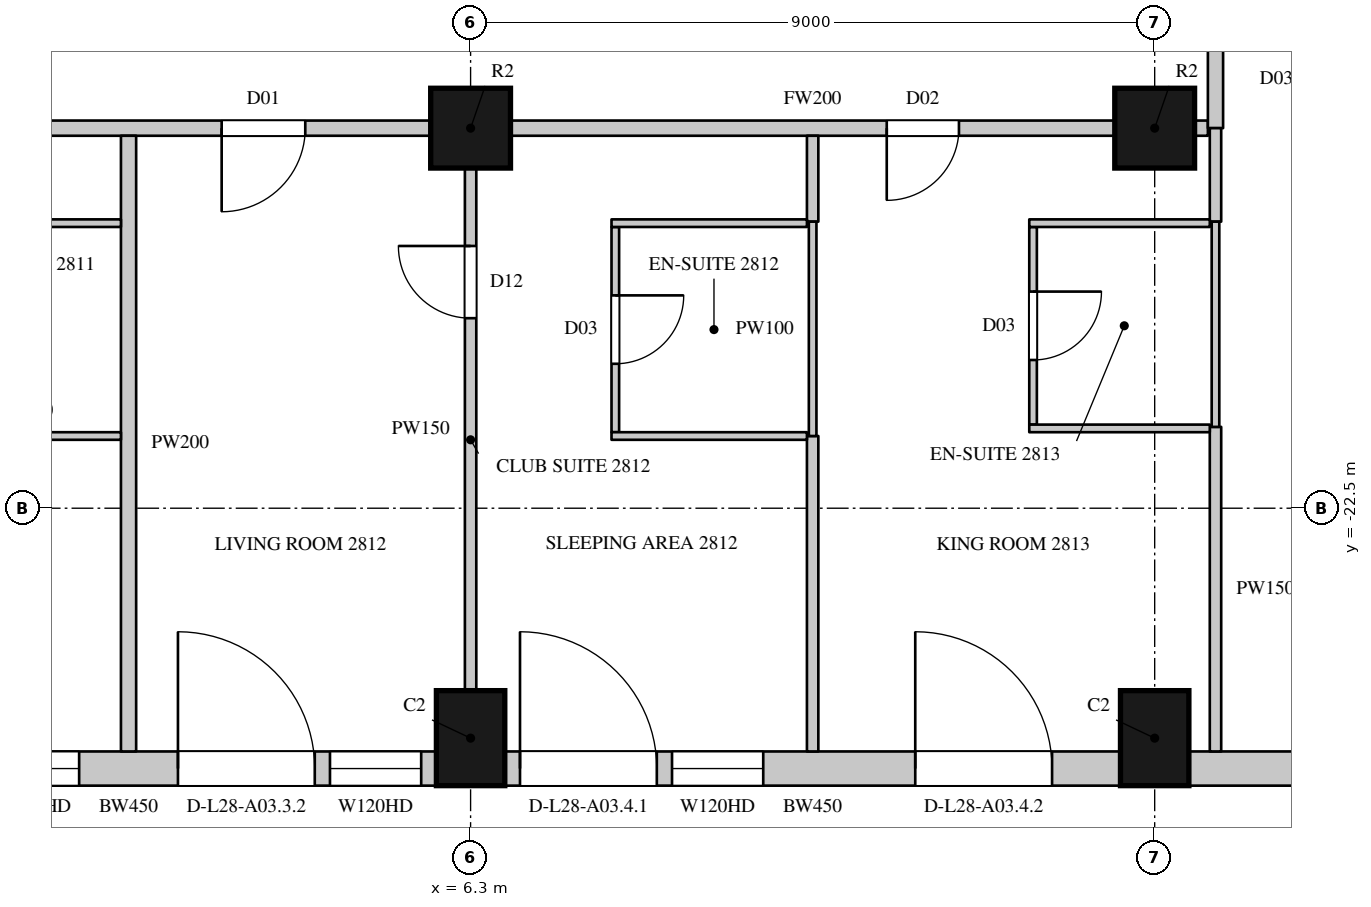
"""IFC4 building model, lengths in metres.
Left out: names, types, materials, properties, quantities, classifications, styles, units other than length and angle.
Written with IfcOpenShell. Run it as: python <this file> out.ifc"""

import sys

from ifc_helpers import new_model, si_unit, direction, frame, frame_2d, origin, origin_2d, place, context, subcontext, project, spatial, rectangle, circle, extrude, element, fill, save


model = new_model("IFC4")
c1 = context("Model", 3, precision=1e-05, world=origin(), true_north=direction((0.0, 1.0)))
c2 = subcontext(c1, "Body", "Model", "MODEL_VIEW")
j1 = project(units=[si_unit("LENGTHUNIT", "METRE"), si_unit("PLANEANGLEUNIT", "RADIAN")], contexts=[c1])
p1 = place(None, origin())
s1 = spatial("IfcSite", under=j1, at=p1, CompositionType="ELEMENT")
p2 = place(p1, origin())
s2 = spatial("IfcBuilding", under=s1, at=p2, CompositionType="ELEMENT")
p3 = place(p2, frame((0.0, 0.0, 131.1)))
s3 = spatial("IfcBuildingStorey", under=s2, at=p3, CompositionType="ELEMENT", Elevation=131.1)
for number, where, z_axis, x_axis in (
    (1, (6.3, -25.525, 0.0), (0.0, 0.0, 1.0), (1.0, 0.0, 0.0)),
    (2, (15.3, -25.525, 0.0), (0.0, 0.0, 1.0), (1.0, 0.0, 0.0)),
):
    element("IfcColumn", number, at=place(p3, frame(where, z_axis=z_axis, x_axis=x_axis)), inside=s3, PredefinedType="COLUMN", context=c2, shape_type="SweptSolid", body=[
        extrude(rectangle(XDim=0.9, YDim=1.25, at=origin_2d()), origin(), (0.0, 0.0, 1.0), 3.6),
    ])
for number, where, z_axis, x_axis in (
    (3, (6.3, -17.5, 0.0), (0.0, 0.0, 1.0), (1.0, 0.0, 0.0)),
    (4, (15.3, -17.5, 0.0), (0.0, 0.0, 1.0), (1.0, 0.0, 0.0)),
):
    element("IfcColumn", number, at=place(p3, frame(where, z_axis=z_axis, x_axis=x_axis)), inside=s3, PredefinedType="COLUMN", context=c2, shape_type="SweptSolid", body=[
        extrude(circle(Radius=0.525, at=origin_2d()), origin(), (0.0, 0.0, 1.0), 3.6),
    ])
p4 = place(p3, frame((-2.25, -25.925, 0.0), z_axis=(0.0, 0.0, 1.0), x_axis=(1.0, 0.0, 0.0)))
e5 = element("IfcWall", 5, at=p4, inside=s3, PredefinedType="SOLIDWALL", context=c2, shape_type="SweptSolid", body=[
    extrude(rectangle(XDim=8.1, YDim=0.45, at=frame_2d((4.05, 0.0))), origin(), (0.0, 0.0, 1.0), 3.3),
])
p5 = place(p4, frame((0.2, 0.0, 0.0)))
e6 = element("IfcOpeningElement", 6, at=p5, cuts=e5, PredefinedType="OPENING", context=c2, shape_type="SweptSolid", body=[
    extrude(rectangle(XDim=1.8, YDim=2.4, at=frame_2d((0.9, 1.2))), frame((0.0, 0.235, 0.0), z_axis=(0.0, -1.0, 0.0), x_axis=(1.0, 0.0, 0.0)), (0.0, 0.0, 1.0), 0.47),
])
p6 = place(p4, frame((2.2, 0.0, 1.05)))
e7 = element("IfcOpeningElement", 7, at=p6, cuts=e5, PredefinedType="OPENING", context=c2, shape_type="SweptSolid", body=[
    extrude(rectangle(XDim=1.2, YDim=2.0, at=frame_2d((0.6, 1.0))), frame((0.0, 0.235, 0.0), z_axis=(0.0, -1.0, 0.0), x_axis=(1.0, 0.0, 0.0)), (0.0, 0.0, 1.0), 0.47),
])
p7 = place(p4, frame((4.7, 0.0, 0.0)))
e8 = element("IfcOpeningElement", 8, at=p7, cuts=e5, PredefinedType="OPENING", context=c2, shape_type="SweptSolid", body=[
    extrude(rectangle(XDim=1.8, YDim=2.4, at=frame_2d((0.9, 1.2))), frame((0.0, 0.235, 0.0), z_axis=(0.0, -1.0, 0.0), x_axis=(1.0, 0.0, 0.0)), (0.0, 0.0, 1.0), 0.47),
])
p8 = place(p4, frame((6.7, 0.0, 1.05)))
e9 = element("IfcOpeningElement", 9, at=p8, cuts=e5, PredefinedType="OPENING", context=c2, shape_type="SweptSolid", body=[
    extrude(rectangle(XDim=1.2, YDim=2.0, at=frame_2d((0.6, 1.0))), frame((0.0, 0.235, 0.0), z_axis=(0.0, -1.0, 0.0), x_axis=(1.0, 0.0, 0.0)), (0.0, 0.0, 1.0), 0.47),
])
p9 = place(p3, frame((6.75, -25.925, 0.0), z_axis=(0.0, 0.0, 1.0), x_axis=(1.0, 0.0, 0.0)))
e10 = element("IfcWall", 10, at=p9, inside=s3, PredefinedType="SOLIDWALL", context=c2, shape_type="SweptSolid", body=[
    extrude(rectangle(XDim=8.1, YDim=0.45, at=frame_2d((4.05, 0.0))), origin(), (0.0, 0.0, 1.0), 3.3),
])
p10 = place(p9, frame((0.2, 0.0, 0.0)))
e11 = element("IfcOpeningElement", 11, at=p10, cuts=e10, PredefinedType="OPENING", context=c2, shape_type="SweptSolid", body=[
    extrude(rectangle(XDim=1.8, YDim=2.4, at=frame_2d((0.9, 1.2))), frame((0.0, 0.235, 0.0), z_axis=(0.0, -1.0, 0.0), x_axis=(1.0, 0.0, 0.0)), (0.0, 0.0, 1.0), 0.47),
])
p11 = place(p9, frame((2.2, 0.0, 1.05)))
e12 = element("IfcOpeningElement", 12, at=p11, cuts=e10, PredefinedType="OPENING", context=c2, shape_type="SweptSolid", body=[
    extrude(rectangle(XDim=1.2, YDim=2.0, at=frame_2d((0.6, 1.0))), frame((0.0, 0.235, 0.0), z_axis=(0.0, -1.0, 0.0), x_axis=(1.0, 0.0, 0.0)), (0.0, 0.0, 1.0), 0.47),
])
p12 = place(p9, frame((5.4, 0.0, 0.0)))
e13 = element("IfcOpeningElement", 13, at=p12, cuts=e10, PredefinedType="OPENING", context=c2, shape_type="SweptSolid", body=[
    extrude(rectangle(XDim=1.8, YDim=2.4, at=frame_2d((0.9, 1.2))), frame((0.0, 0.235, 0.0), z_axis=(0.0, -1.0, 0.0), x_axis=(1.0, 0.0, 0.0)), (0.0, 0.0, 1.0), 0.47),
])
p13 = place(p3, frame((15.75, -25.925, 0.0), z_axis=(0.0, 0.0, 1.0), x_axis=(1.0, 0.0, 0.0)))
e14 = element("IfcWall", 14, at=p13, inside=s3, PredefinedType="SOLIDWALL", context=c2, shape_type="SweptSolid", body=[
    extrude(rectangle(XDim=2.914, YDim=0.45, at=frame_2d((1.457, 0.0))), origin(), (0.0, 0.0, 1.0), 3.3),
])
p14 = place(p3, frame((-2.175, -17.5, 0.0), z_axis=(0.0, 0.0, 1.0), x_axis=(1.0, 0.0, 0.0)))
e15 = element("IfcWall", 15, at=p14, inside=s3, PredefinedType="PARTITIONING", context=c2, shape_type="SweptSolid", body=[
    extrude(rectangle(XDim=7.95, YDim=0.2, at=frame_2d((3.975, 0.0))), origin(), (0.0, 0.0, 1.0), 2.75),
])
p15 = place(p14, frame((5.2, 0.0, 0.0)))
e16 = element("IfcOpeningElement", 16, at=p15, cuts=e15, PredefinedType="OPENING", context=c2, shape_type="SweptSolid", body=[
    extrude(rectangle(XDim=1.1, YDim=2.4, at=frame_2d((0.55, 1.2))), frame((0.0, 0.11, 0.0), z_axis=(0.0, -1.0, 0.0), x_axis=(1.0, 0.0, 0.0)), (0.0, 0.0, 1.0), 0.22),
])
p16 = place(p3, frame((6.825, -17.5, 0.0), z_axis=(0.0, 0.0, 1.0), x_axis=(1.0, 0.0, 0.0)))
e17 = element("IfcWall", 17, at=p16, inside=s3, PredefinedType="PARTITIONING", context=c2, shape_type="SweptSolid", body=[
    extrude(rectangle(XDim=7.95, YDim=0.2, at=frame_2d((3.975, 0.0))), origin(), (0.0, 0.0, 1.0), 2.75),
])
p17 = place(p16, frame((4.95, 0.0, 0.0)))
e18 = element("IfcOpeningElement", 18, at=p17, cuts=e17, PredefinedType="OPENING", context=c2, shape_type="SweptSolid", body=[
    extrude(rectangle(XDim=0.95, YDim=2.2, at=frame_2d((0.475, 1.1))), frame((0.0, 0.11, 0.0), z_axis=(0.0, -1.0, 0.0), x_axis=(1.0, 0.0, 0.0)), (0.0, 0.0, 1.0), 0.22),
])
p18 = place(p3, frame((15.825, -17.5, 0.0), z_axis=(0.0, 0.0, 1.0), x_axis=(1.0, 0.0, 0.0)))
e19 = element("IfcWall", 19, at=p18, inside=s3, PredefinedType="PARTITIONING", context=c2, shape_type="SweptSolid", body=[
    extrude(rectangle(XDim=0.175, YDim=0.2, at=frame_2d((0.087, 0.0))), origin(), (0.0, 0.0, 1.0), 3.3),
])
p19 = place(p3, frame((16.1, -17.5, 0.0), z_axis=(0.0, 0.0, 1.0), x_axis=(0.0, 1.0, 0.0)))
e20 = element("IfcWall", 20, at=p19, inside=s3, PredefinedType="PARTITIONING", context=c2, shape_type="SweptSolid", body=[
    extrude(rectangle(XDim=12.75, YDim=0.2, at=frame_2d((6.375, 0.0))), origin(), (0.0, 0.0, 1.0), 3.3),
])
p20 = place(p19, frame((2.75, 0.0, 0.0)))
e21 = element("IfcOpeningElement", 21, at=p20, cuts=e20, PredefinedType="OPENING", context=c2, shape_type="SweptSolid", body=[
    extrude(rectangle(XDim=0.95, YDim=2.2, at=frame_2d((0.475, 1.1))), frame((0.0, 0.11, 0.0), z_axis=(0.0, -1.0, 0.0), x_axis=(1.0, 0.0, 0.0)), (0.0, 0.0, 1.0), 0.22),
])
p21 = place(p19, frame((6.95, 0.0, 0.0)))
e22 = element("IfcOpeningElement", 22, at=p21, cuts=e20, PredefinedType="OPENING", context=c2, shape_type="SweptSolid", body=[
    extrude(rectangle(XDim=0.95, YDim=2.2, at=frame_2d((0.475, 1.1))), frame((0.0, 0.11, 0.0), z_axis=(0.0, -1.0, 0.0), x_axis=(1.0, 0.0, 0.0)), (0.0, 0.0, 1.0), 0.22),
])
p22 = place(p19, frame((11.4, 0.0, 0.0)))
e23 = element("IfcOpeningElement", 23, at=p22, cuts=e20, PredefinedType="OPENING", context=c2, shape_type="SweptSolid", body=[
    extrude(rectangle(XDim=0.95, YDim=2.2, at=frame_2d((0.475, 1.1))), frame((0.0, 0.11, 0.0), z_axis=(0.0, -1.0, 0.0), x_axis=(1.0, 0.0, 0.0)), (0.0, 0.0, 1.0), 0.22),
])
p23 = place(p3, frame((6.3, -24.9, 0.0), z_axis=(0.0, 0.0, 1.0), x_axis=(0.0, 1.0, 0.0)))
e24 = element("IfcWall", 24, at=p23, inside=s3, PredefinedType="PARTITIONING", context=c2, shape_type="SweptSolid", body=[
    extrude(rectangle(XDim=6.875, YDim=0.15, at=frame_2d((3.438, 0.0))), origin(), (0.0, 0.0, 1.0), 2.75),
])
p24 = place(p23, frame((4.9, 0.0, 0.0)))
e25 = element("IfcOpeningElement", 25, at=p24, cuts=e24, PredefinedType="OPENING", context=c2, shape_type="SweptSolid", body=[
    extrude(rectangle(XDim=0.95, YDim=2.2, at=frame_2d((0.475, 1.1))), frame((0.0, 0.085, 0.0), z_axis=(0.0, -1.0, 0.0), x_axis=(1.0, 0.0, 0.0)), (0.0, 0.0, 1.0), 0.17),
])
p25 = place(p3, frame((10.8, -25.7, 0.0), z_axis=(0.0, 0.0, 1.0), x_axis=(0.0, 1.0, 0.0)))
e26 = element("IfcWall", 26, at=p25, inside=s3, PredefinedType="PARTITIONING", context=c2, shape_type="SweptSolid", body=[
    extrude(rectangle(XDim=4.15, YDim=0.15, at=frame_2d((2.075, 0.0))), origin(), (0.0, 0.0, 1.0), 2.65),
])
p26 = place(p3, frame((10.8, -18.73, 0.0), z_axis=(0.0, 0.0, 1.0), x_axis=(0.0, 1.0, 0.0)))
e27 = element("IfcWall", 27, at=p26, inside=s3, PredefinedType="PARTITIONING", context=c2, shape_type="SweptSolid", body=[
    extrude(rectangle(XDim=1.13, YDim=0.15, at=frame_2d((0.565, 0.0))), origin(), (0.0, 0.0, 1.0), 2.65),
])
p27 = place(p3, frame((16.1, -25.7, 0.0), z_axis=(0.0, 0.0, 1.0), x_axis=(0.0, 1.0, 0.0)))
e28 = element("IfcWall", 28, at=p27, inside=s3, PredefinedType="PARTITIONING", context=c2, shape_type="SweptSolid", body=[
    extrude(rectangle(XDim=4.27, YDim=0.15, at=frame_2d((2.135, 0.0))), origin(), (0.0, 0.0, 1.0), 3.3),
])
p28 = place(p3, frame((16.1, -18.73, 0.0), z_axis=(0.0, 0.0, 1.0), x_axis=(0.0, 1.0, 0.0)))
e29 = element("IfcWall", 29, at=p28, inside=s3, PredefinedType="PARTITIONING", context=c2, shape_type="SweptSolid", body=[
    extrude(rectangle(XDim=1.23, YDim=0.15, at=frame_2d((0.615, 0.0))), origin(), (0.0, 0.0, 1.0), 3.3),
])
p29 = place(p3, frame((1.8, -25.7, 0.0), z_axis=(0.0, 0.0, 1.0), x_axis=(0.0, 1.0, 0.0)))
e30 = element("IfcWall", 30, at=p29, inside=s3, PredefinedType="PARTITIONING", context=c2, shape_type="SweptSolid", body=[
    extrude(rectangle(XDim=8.1, YDim=0.2, at=frame_2d((4.05, 0.0))), origin(), (0.0, 0.0, 1.0), 2.65),
])
for number, where, z_axis, x_axis in (
    (31, (-0.846, -21.55, 0.0), (0.0, 0.0, 1.0), (1.0, 0.0, 0.0)),
    (32, (-0.846, -18.75, 0.0), (0.0, 0.0, 1.0), (1.0, 0.0, 0.0)),
):
    element("IfcWall", number, at=place(p3, frame(where, z_axis=z_axis, x_axis=x_axis)), inside=s3, PredefinedType="PARTITIONING", context=c2, shape_type="SweptSolid", body=[
        extrude(rectangle(XDim=2.546, YDim=0.1, at=frame_2d((1.273, 0.0))), origin(), (0.0, 0.0, 1.0), 3.3),
    ])
p30 = place(p3, frame((8.204, -21.5, 0.0), z_axis=(0.0, 0.0, 1.0), x_axis=(0.0, 1.0, 0.0)))
e33 = element("IfcWall", 33, at=p30, inside=s3, PredefinedType="PARTITIONING", context=c2, shape_type="SweptSolid", body=[
    extrude(rectangle(XDim=2.7, YDim=0.1, at=frame_2d((1.35, 0.0))), origin(), (0.0, 0.0, 1.0), 3.3),
])
p31 = place(p30, frame((0.9, 0.0, 0.0)))
e34 = element("IfcOpeningElement", 34, at=p31, cuts=e33, PredefinedType="OPENING", context=c2, shape_type="SweptSolid", body=[
    extrude(rectangle(XDim=0.9, YDim=2.2, at=frame_2d((0.45, 1.1))), frame((0.0, 0.06, 0.0), z_axis=(0.0, -1.0, 0.0), x_axis=(1.0, 0.0, 0.0)), (0.0, 0.0, 1.0), 0.12),
])
for number, where, z_axis, x_axis in (
    (35, (8.154, -21.55, 0.0), (0.0, 0.0, 1.0), (1.0, 0.0, 0.0)),
    (36, (8.154, -18.75, 0.0), (0.0, 0.0, 1.0), (1.0, 0.0, 0.0)),
):
    element("IfcWall", number, at=place(p3, frame(where, z_axis=z_axis, x_axis=x_axis)), inside=s3, PredefinedType="PARTITIONING", context=c2, shape_type="SweptSolid", body=[
        extrude(rectangle(XDim=2.571, YDim=0.1, at=frame_2d((1.286, 0.0))), origin(), (0.0, 0.0, 1.0), 3.3),
    ])
p32 = place(p3, frame((10.8, -21.55, 0.0), z_axis=(0.0, 0.0, 1.0), x_axis=(0.0, 1.0, 0.0)))
e37 = element("IfcWall", 37, at=p32, inside=s3, PredefinedType="PARTITIONING", context=c2, shape_type="SweptSolid", body=[
    extrude(rectangle(XDim=2.82, YDim=0.1, at=frame_2d((1.41, 0.0))), origin(), (0.0, 0.0, 1.0), 2.65),
])
p33 = place(p3, frame((13.7, -21.4, 0.0), z_axis=(0.0, 0.0, 1.0), x_axis=(0.0, 1.0, 0.0)))
e38 = element("IfcWall", 38, at=p33, inside=s3, PredefinedType="PARTITIONING", context=c2, shape_type="SweptSolid", body=[
    extrude(rectangle(XDim=2.6, YDim=0.1, at=frame_2d((1.3, 0.0))), origin(), (0.0, 0.0, 1.0), 3.3),
])
p34 = place(p33, frame((0.85, 0.0, 0.0)))
e39 = element("IfcOpeningElement", 39, at=p34, cuts=e38, PredefinedType="OPENING", context=c2, shape_type="SweptSolid", body=[
    extrude(rectangle(XDim=0.9, YDim=2.2, at=frame_2d((0.45, 1.1))), frame((0.0, 0.06, 0.0), z_axis=(0.0, -1.0, 0.0), x_axis=(1.0, 0.0, 0.0)), (0.0, 0.0, 1.0), 0.12),
])
for number, where, z_axis, x_axis in (
    (40, (13.65, -21.45, 0.0), (0.0, 0.0, 1.0), (1.0, 0.0, 0.0)),
    (41, (13.65, -18.75, 0.0), (0.0, 0.0, 1.0), (1.0, 0.0, 0.0)),
):
    element("IfcWall", number, at=place(p3, frame(where, z_axis=z_axis, x_axis=x_axis)), inside=s3, PredefinedType="PARTITIONING", context=c2, shape_type="SweptSolid", body=[
        extrude(rectangle(XDim=2.375, YDim=0.1, at=frame_2d((1.188, 0.0))), origin(), (0.0, 0.0, 1.0), 3.3),
    ])
p35 = place(p3, frame((16.1, -21.43, 0.0), z_axis=(0.0, 0.0, 1.0), x_axis=(0.0, 1.0, 0.0)))
e42 = element("IfcWall", 42, at=p35, inside=s3, PredefinedType="PARTITIONING", context=c2, shape_type="SweptSolid", body=[
    extrude(rectangle(XDim=2.7, YDim=0.1, at=frame_2d((1.35, 0.0))), origin(), (0.0, 0.0, 1.0), 3.3),
])
p36 = place(p6, origin())
e43 = element("IfcWindow", 43, at=p36, inside=s3, PartitioningType="SINGLE_PANEL", PredefinedType="WINDOW", context=c2, shape_type="SweptSolid", body=[
    extrude(rectangle(XDim=1.2, YDim=2.0, at=frame_2d((0.6, 1.0))), frame((0.0, 0.135, 0.0), z_axis=(0.0, -1.0, 0.0), x_axis=(1.0, 0.0, 0.0)), (0.0, 0.0, 1.0), 0.06),
])
fill(e7, e43)
p37 = place(p7, origin())
e44 = element("IfcDoor", 44, at=p37, inside=s3, OperationType="SLIDING_TO_LEFT", PredefinedType="DOOR", context=c2, shape_type="SweptSolid", body=[
    extrude(rectangle(XDim=1.8, YDim=2.4, at=frame_2d((0.9, 1.2))), frame((0.0, 0.13, 0.0), z_axis=(0.0, -1.0, 0.0), x_axis=(1.0, 0.0, 0.0)), (0.0, 0.0, 1.0), 0.05),
])
fill(e8, e44)
p38 = place(p8, origin())
e45 = element("IfcWindow", 45, at=p38, inside=s3, PartitioningType="SINGLE_PANEL", PredefinedType="WINDOW", context=c2, shape_type="SweptSolid", body=[
    extrude(rectangle(XDim=1.2, YDim=2.0, at=frame_2d((0.6, 1.0))), frame((0.0, 0.135, 0.0), z_axis=(0.0, -1.0, 0.0), x_axis=(1.0, 0.0, 0.0)), (0.0, 0.0, 1.0), 0.06),
])
fill(e9, e45)
p39 = place(p10, origin())
e46 = element("IfcDoor", 46, at=p39, inside=s3, OperationType="SLIDING_TO_LEFT", PredefinedType="DOOR", context=c2, shape_type="SweptSolid", body=[
    extrude(rectangle(XDim=1.8, YDim=2.4, at=frame_2d((0.9, 1.2))), frame((0.0, 0.13, 0.0), z_axis=(0.0, -1.0, 0.0), x_axis=(1.0, 0.0, 0.0)), (0.0, 0.0, 1.0), 0.05),
])
fill(e11, e46)
p40 = place(p11, origin())
e47 = element("IfcWindow", 47, at=p40, inside=s3, PartitioningType="SINGLE_PANEL", PredefinedType="WINDOW", context=c2, shape_type="SweptSolid", body=[
    extrude(rectangle(XDim=1.2, YDim=2.0, at=frame_2d((0.6, 1.0))), frame((0.0, 0.135, 0.0), z_axis=(0.0, -1.0, 0.0), x_axis=(1.0, 0.0, 0.0)), (0.0, 0.0, 1.0), 0.06),
])
fill(e12, e47)
p41 = place(p12, origin())
e48 = element("IfcDoor", 48, at=p41, inside=s3, OperationType="SLIDING_TO_LEFT", PredefinedType="DOOR", context=c2, shape_type="SweptSolid", body=[
    extrude(rectangle(XDim=1.8, YDim=2.4, at=frame_2d((0.9, 1.2))), frame((0.0, 0.13, 0.0), z_axis=(0.0, -1.0, 0.0), x_axis=(1.0, 0.0, 0.0)), (0.0, 0.0, 1.0), 0.05),
])
fill(e13, e48)
p42 = place(p15, origin())
e49 = element("IfcDoor", 49, at=p42, inside=s3, OperationType="SINGLE_SWING_RIGHT", PredefinedType="DOOR", context=c2, shape_type="SweptSolid", body=[
    extrude(rectangle(XDim=1.1, YDim=2.4, at=frame_2d((0.55, 1.2))), frame((0.0, 0.025, 0.0), z_axis=(0.0, -1.0, 0.0), x_axis=(1.0, 0.0, 0.0)), (0.0, 0.0, 1.0), 0.05),
])
fill(e16, e49)
p43 = place(p24, origin())
e50 = element("IfcDoor", 50, at=p43, inside=s3, OperationType="SINGLE_SWING_RIGHT", PredefinedType="DOOR", context=c2, shape_type="SweptSolid", body=[
    extrude(rectangle(XDim=0.95, YDim=2.2, at=frame_2d((0.475, 1.1))), frame((0.0, 0.025, 0.0), z_axis=(0.0, -1.0, 0.0), x_axis=(1.0, 0.0, 0.0)), (0.0, 0.0, 1.0), 0.05),
])
fill(e25, e50)
p44 = place(p31, origin())
e51 = element("IfcDoor", 51, at=p44, inside=s3, OperationType="SINGLE_SWING_LEFT", PredefinedType="DOOR", context=c2, shape_type="SweptSolid", body=[
    extrude(rectangle(XDim=0.9, YDim=2.2, at=frame_2d((0.45, 1.1))), frame((0.0, 0.025, 0.0), z_axis=(0.0, -1.0, 0.0), x_axis=(1.0, 0.0, 0.0)), (0.0, 0.0, 1.0), 0.05),
])
fill(e34, e51)
p45 = place(p17, origin())
e52 = element("IfcDoor", 52, at=p45, inside=s3, OperationType="SINGLE_SWING_RIGHT", PredefinedType="DOOR", context=c2, shape_type="SweptSolid", body=[
    extrude(rectangle(XDim=0.95, YDim=2.2, at=frame_2d((0.475, 1.1))), frame((0.0, 0.025, 0.0), z_axis=(0.0, -1.0, 0.0), x_axis=(1.0, 0.0, 0.0)), (0.0, 0.0, 1.0), 0.05),
])
fill(e18, e52)
p46 = place(p34, origin())
e53 = element("IfcDoor", 53, at=p46, inside=s3, OperationType="SINGLE_SWING_LEFT", PredefinedType="DOOR", context=c2, shape_type="SweptSolid", body=[
    extrude(rectangle(XDim=0.9, YDim=2.2, at=frame_2d((0.45, 1.1))), frame((0.0, 0.025, 0.0), z_axis=(0.0, -1.0, 0.0), x_axis=(1.0, 0.0, 0.0)), (0.0, 0.0, 1.0), 0.05),
])
fill(e39, e53)
save(model, sys.argv[1])
